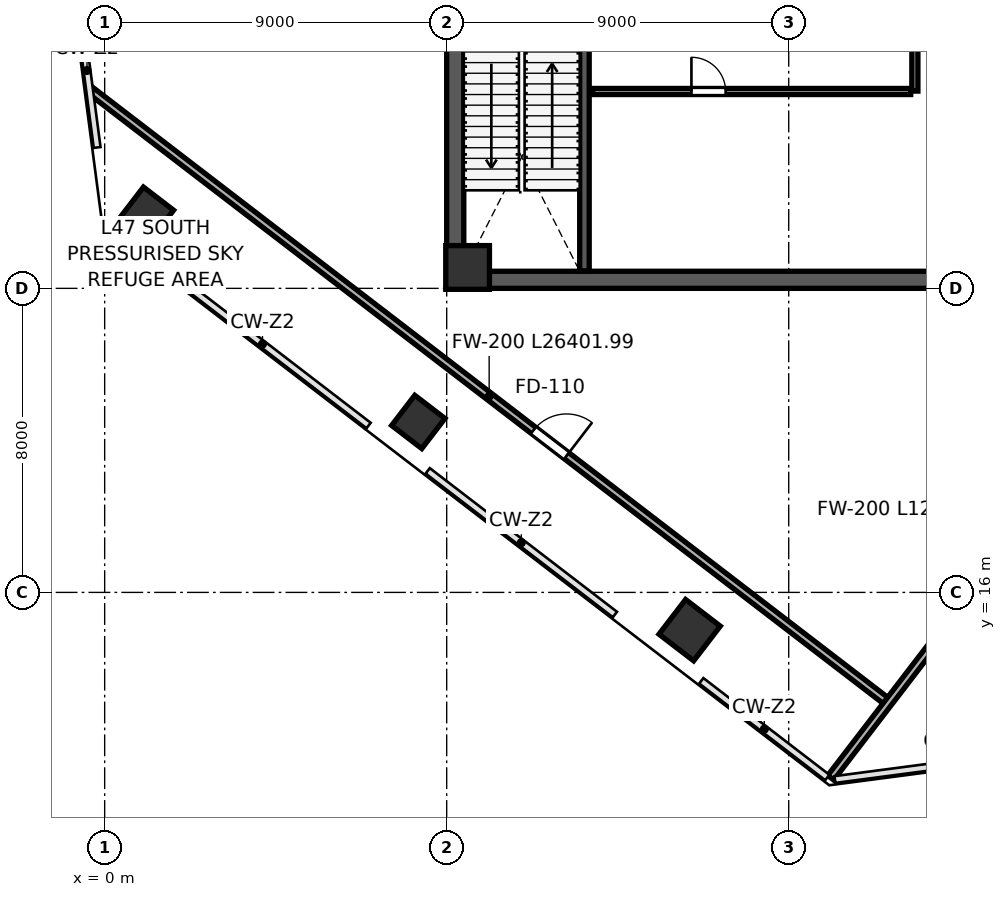
"""IFC4 building model, lengths in metres.
Left out: names, types, materials, properties, quantities, classifications, styles, units other than length and angle.
Written with IfcOpenShell. Run it as: python <this file> out.ifc"""

import sys

from ifc_helpers import new_model, si_unit, direction, frame, frame_2d, origin, origin_2d, place, context, subcontext, project, spatial, rectangle, extrude, clip, halfspace, source, transform, mapped, element, fill, save


model = new_model("IFC4")
c1 = context("Model", 3, precision=1e-05, world=origin(), true_north=direction((0.0, 1.0)))
c2 = subcontext(c1, "Body", "Model", "MODEL_VIEW")
j1 = project(units=[si_unit("LENGTHUNIT", "METRE"), si_unit("PLANEANGLEUNIT", "RADIAN")], contexts=[c1])
p1 = place(None, origin())
s1 = spatial("IfcSite", under=j1, at=p1, CompositionType="ELEMENT")
p2 = place(p1, origin())
s2 = spatial("IfcBuilding", under=s1, at=p2, CompositionType="ELEMENT")
p3 = place(p2, frame((0.0, 0.0, 209.8)))
s3 = spatial("IfcBuildingStorey", under=s2, at=p3, CompositionType="ELEMENT", Elevation=209.8)
m1 = source(origin(), c2, "Body", "SweptSolid", [
    extrude(rectangle(XDim=1.15, YDim=1.15, at=origin_2d()), origin(), (0.0, 0.0, 1.0), 5.398),
])
p4 = place(p3, frame((9.55, 24.55, 0.001), z_axis=(0.0, 0.0, 1.0), x_axis=(1.0, 0.0, 0.0)))
e1 = element("IfcColumn", 1, at=p4, inside=s3, PredefinedType="COLUMN", context=c2, shape_type="MappedRepresentation", body=[
    mapped(m1, transform((0.0, 0.0, 0.0), scale=1.0)),
])
p5 = place(p3, frame((1.112, 25.964, 0.0), z_axis=(-0.044514743961, 0.163354405765, 0.985562669589), x_axis=(0.923184915789, -0.370278518826, 0.103070023551)))
e2 = element("IfcColumn", 2, at=p5, inside=s3, PredefinedType="COLUMN", context=c2, shape_type="Clipping", body=[
    clip(clip(extrude(rectangle(XDim=1.0, YDim=1.0, at=origin_2d()), origin(), (0.0, 0.0, 1.0), 5.479), halfspace(frame((0.0, 0.0, 0.121), z_axis=(0.0, 0.0, -1.0), x_axis=(1.0, 0.0, 0.0)), False)), halfspace(frame((0.0, 0.0, 5.358), z_axis=(0.0, 0.0, 1.0), x_axis=(1.0, 0.0, 0.0)), False)),
])
p6 = place(p3, frame((8.253, 20.485, 0.0), z_axis=(-0.089797034875, 0.107926545905, 0.990095123317), x_axis=(0.995364860446, 0.044089068892, 0.085468991996)))
e3 = element("IfcColumn", 3, at=p6, inside=s3, PredefinedType="COLUMN", context=c2, shape_type="Clipping", body=[
    clip(clip(extrude(rectangle(XDim=1.0, YDim=1.0, at=origin_2d()), origin(), (0.0, 0.0, 1.0), 5.454), halfspace(frame((0.0, 0.0, 0.1), z_axis=(0.0, 0.0, -1.0), x_axis=(1.0, 0.0, 0.0)), False)), halfspace(frame((0.0, 0.0, 5.354), z_axis=(0.0, 0.0, 1.0), x_axis=(1.0, 0.0, 0.0)), False)),
])
p7 = place(p3, frame((15.393, 15.006, 0.0), z_axis=(-0.134752080978, 0.051807074958, 0.989524079372), x_axis=(0.846959808936, 0.524342635699, 0.087885621321)))
e4 = element("IfcColumn", 4, at=p7, inside=s3, PredefinedType="COLUMN", context=c2, shape_type="Clipping", body=[
    clip(clip(extrude(rectangle(XDim=1.15, YDim=1.15, at=origin_2d()), origin(), (0.0, 0.0, 1.0), 5.457), halfspace(frame((0.0, 0.0, 0.118), z_axis=(0.0, 0.0, -1.0), x_axis=(1.0, 0.0, 0.0)), False)), halfspace(frame((0.0, 0.0, 5.339), z_axis=(0.0, 0.0, 1.0), x_axis=(1.0, 0.0, 0.0)), False)),
])
p8 = place(p3, frame((9.225, 24.45, 0.0), z_axis=(0.0, 0.0, 1.0), x_axis=(0.0, 1.0, 0.0)))
e5 = element("IfcWall", 5, at=p8, inside=s3, PredefinedType="SHEAR", context=c2, shape_type="SweptSolid", body=[
    extrude(rectangle(XDim=15.1, YDim=0.45, at=frame_2d((7.55, 0.0))), origin(), (0.0, 0.0, 1.0), 5.12),
])
p9 = place(p3, frame((9.0, 24.225, 0.0), z_axis=(0.0, 0.0, 1.0), x_axis=(1.0, 0.0, 0.0)))
e6 = element("IfcWall", 6, at=p9, inside=s3, PredefinedType="SHEAR", context=c2, shape_type="SweptSolid", body=[
    extrude(rectangle(XDim=18.0, YDim=0.45, at=frame_2d((9.0, 0.0))), origin(), (0.0, 0.0, 1.0), 5.12),
])
p10 = place(p3, frame((12.625, 24.46, 0.0), z_axis=(0.0, 0.0, 1.0), x_axis=(0.0, 1.0, 0.0)))
e7 = element("IfcWall", 7, at=p10, inside=s3, PredefinedType="SHEAR", context=c2, shape_type="SweptSolid", body=[
    extrude(rectangle(XDim=7.49, YDim=0.25, at=frame_2d((3.745, 0.0))), origin(), (0.0, 0.0, 1.0), 5.12),
])
p11 = place(p10, frame((5.85, 0.0, 0.0)))
e8 = element("IfcOpeningElement", 8, at=p11, cuts=e7, PredefinedType="OPENING", context=c2, shape_type="SweptSolid", body=[
    extrude(rectangle(XDim=1.15, YDim=2.2, at=frame_2d((0.575, 1.1))), frame((0.0, 0.135, 0.0), z_axis=(0.0, -1.0, 0.0), x_axis=(1.0, 0.0, 0.0)), (0.0, 0.0, 1.0), 0.27),
])
p12 = place(p3, frame((12.84, 29.18, 0.0), z_axis=(0.0, 0.0, 1.0), x_axis=(1.0, 0.0, 0.0)))
e9 = element("IfcWall", 9, at=p12, inside=s3, PredefinedType="PARTITIONING", context=c2, shape_type="SweptSolid", body=[
    extrude(rectangle(XDim=8.37, YDim=0.16, at=frame_2d((4.185, 0.0))), origin(), (0.0, 0.0, 1.0), 5.12),
])
p13 = place(p12, frame((2.6, 0.0, 0.0)))
e10 = element("IfcOpeningElement", 10, at=p13, cuts=e9, PredefinedType="OPENING", context=c2, shape_type="SweptSolid", body=[
    extrude(rectangle(XDim=0.9, YDim=2.15, at=frame_2d((0.45, 1.075))), frame((0.0, 0.09, 0.0), z_axis=(0.0, -1.0, 0.0), x_axis=(1.0, 0.0, 0.0)), (0.0, 0.0, 1.0), 0.18),
])
p14 = place(p3, frame((21.32, 29.19, 0.0), z_axis=(0.0, 0.0, 1.0), x_axis=(0.0, 1.0, 0.0)))
e11 = element("IfcWall", 11, at=p14, inside=s3, PredefinedType="PARTITIONING", context=c2, shape_type="SweptSolid", body=[
    extrude(rectangle(XDim=2.92, YDim=0.16, at=frame_2d((1.46, 0.0))), origin(), (0.0, 0.0, 1.0), 5.12),
])
p15 = place(p3, frame((-0.356, 29.195, 0.0), z_axis=(0.0, 0.0, 1.0), x_axis=(0.79335253165, -0.60876248285, 0.0)))
e12 = element("IfcWall", 12, at=p15, inside=s3, PredefinedType="SOLIDWALL", context=c2, shape_type="SweptSolid", body=[
    extrude(rectangle(XDim=26.402, YDim=0.2, at=frame_2d((13.201, 0.0))), origin(), (0.0, 0.0, 1.0), 5.12),
])
p16 = place(p15, frame((14.67, 0.0, 0.0)))
e13 = element("IfcOpeningElement", 13, at=p16, cuts=e12, PredefinedType="OPENING", context=c2, shape_type="SweptSolid", body=[
    extrude(rectangle(XDim=1.1, YDim=2.2, at=frame_2d((0.55, 1.1))), frame((0.0, 0.11, 0.0), z_axis=(0.0, -1.0, 0.0), x_axis=(1.0, 0.0, 0.0)), (0.0, 0.0, 1.0), 0.22),
])
p17 = place(p3, frame((19.106, 11.123, 0.0), z_axis=(0.0, 0.0, 1.0), x_axis=(0.608751338357, 0.793361083019, 0.0)))
e14 = element("IfcWall", 14, at=p17, inside=s3, PredefinedType="SOLIDWALL", context=c2, shape_type="SweptSolid", body=[
    extrude(rectangle(XDim=12.98, YDim=0.2, at=frame_2d((6.49, 0.0))), origin(), (0.0, 0.0, 1.0), 5.12),
])
m2 = source(origin(), c2, "Body", "SweptSolid", [
    extrude(rectangle(XDim=0.9, YDim=2.15, at=frame_2d((0.45, 1.075))), frame((0.0, 0.025, 0.0), z_axis=(0.0, -1.0, 0.0), x_axis=(1.0, 0.0, 0.0)), (0.0, 0.0, 1.0), 0.05),
])
p18 = place(p13, origin())
e15 = element("IfcDoor", 15, at=p18, inside=s3, OperationType="SINGLE_SWING_LEFT", PredefinedType="DOOR", context=c2, shape_type="MappedRepresentation", body=[
    mapped(m2, transform((0.0, 0.0, 0.0), scale=1.0)),
])
fill(e10, e15)
m3 = source(origin(), c2, "Body", "SweptSolid", [
    extrude(rectangle(XDim=1.1, YDim=2.2, at=frame_2d((0.55, 1.1))), frame((0.0, 0.025, 0.0), z_axis=(0.0, -1.0, 0.0), x_axis=(1.0, 0.0, 0.0)), (0.0, 0.0, 1.0), 0.05),
])
p19 = place(p16, origin())
e16 = element("IfcDoor", 16, at=p19, inside=s3, OperationType="SINGLE_SWING_RIGHT", PredefinedType="DOOR", context=c2, shape_type="MappedRepresentation", body=[
    mapped(m3, transform((0.0, 0.0, 0.0), scale=1.0)),
])
fill(e13, e16)
save(model, sys.argv[1])
